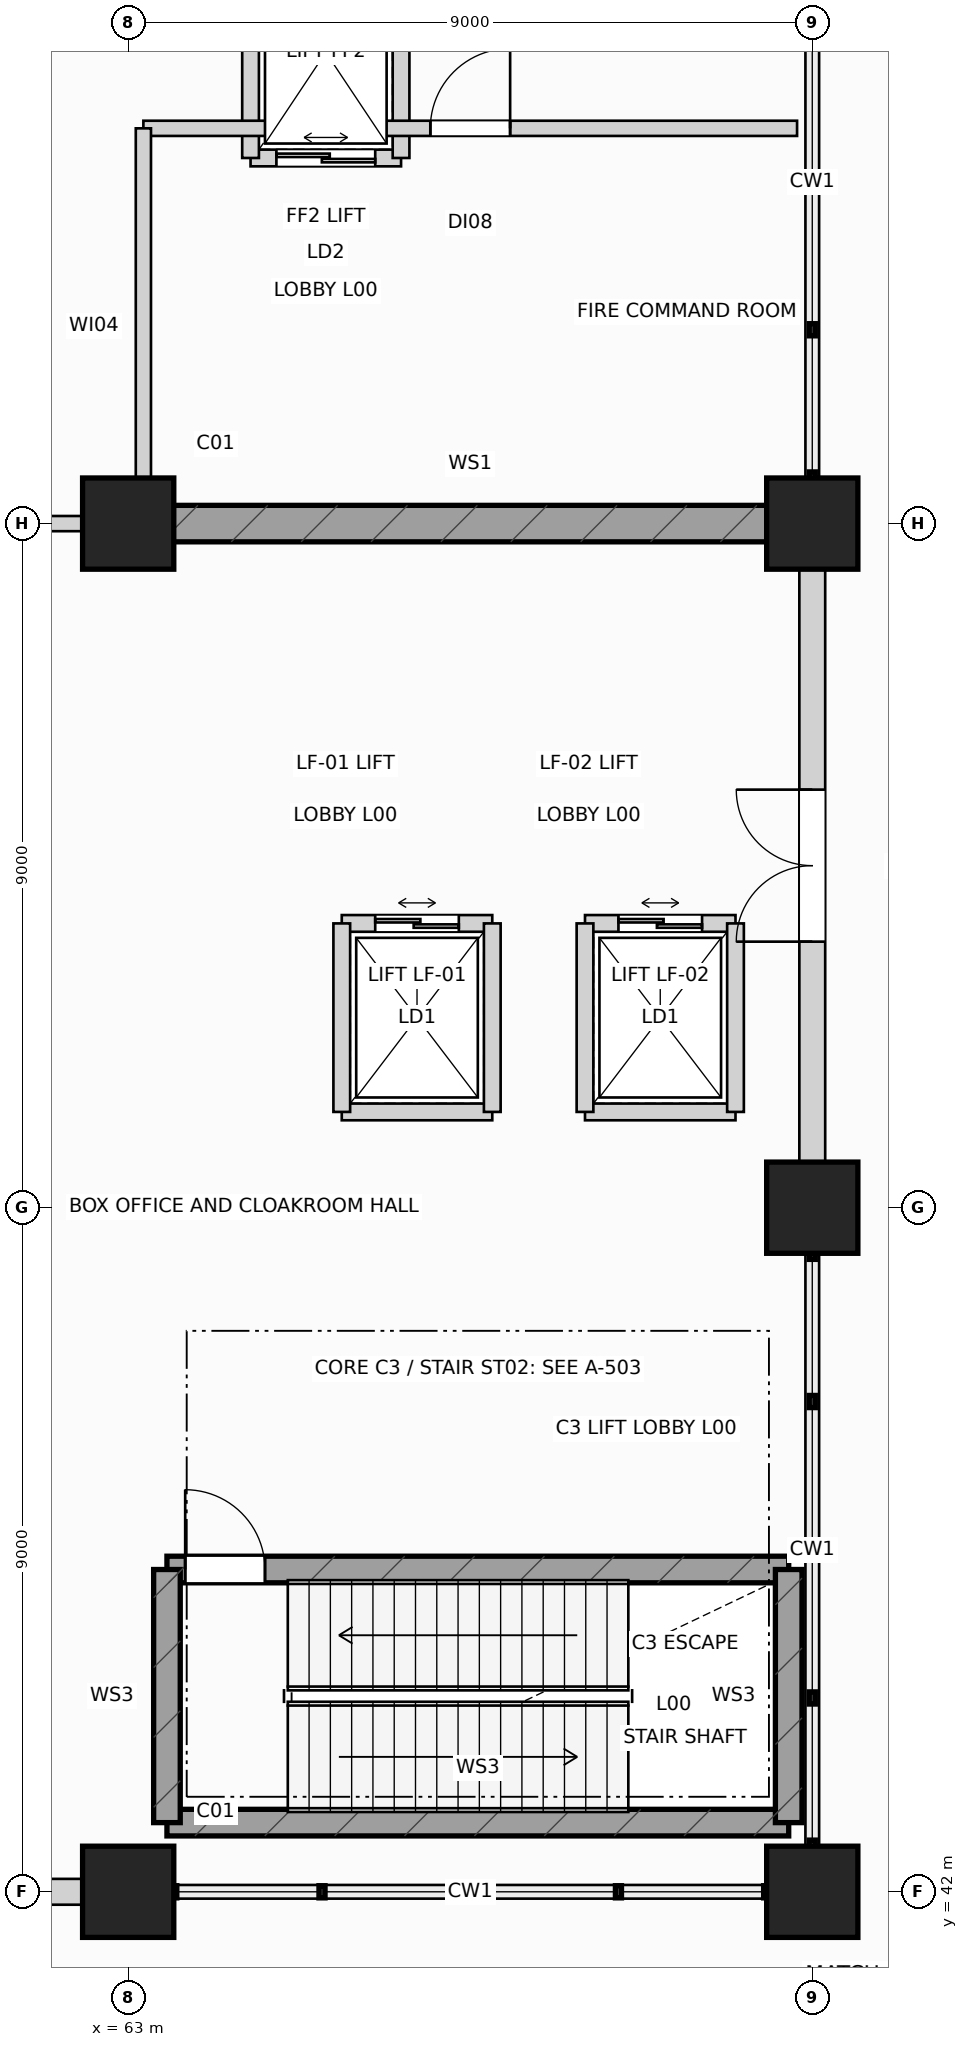
"""IFC4 building model, lengths in metres.
Left out: names, types, materials, properties, quantities, classifications, styles, units other than length and angle.
Written with IfcOpenShell. Run it as: python <this file> out.ifc"""

import sys

from ifc_helpers import new_model, si_unit, direction, frame, frame_2d, origin, origin_2d, place, context, subcontext, project, spatial, rectangle, extrude, element, fill, save


model = new_model("IFC4")
c1 = context("Model", 3, precision=1e-05, world=origin(), true_north=direction((0.0, 1.0)))
c2 = subcontext(c1, "Body", "Model", "MODEL_VIEW")
j1 = project(units=[si_unit("LENGTHUNIT", "METRE"), si_unit("PLANEANGLEUNIT", "RADIAN")], contexts=[c1])
p1 = place(None, origin())
s1 = spatial("IfcSite", under=j1, at=p1, CompositionType="ELEMENT")
p2 = place(p1, origin())
s2 = spatial("IfcBuilding", under=s1, at=p2, CompositionType="ELEMENT")
p3 = place(p2, origin())
s3 = spatial("IfcBuildingStorey", under=s2, at=p3, CompositionType="ELEMENT", Elevation=0.0)
for number, where, z_axis, x_axis in (
    (1, (63.0, 42.0, 0.0), (0.0, 0.0, 1.0), (1.0, 0.0, 0.0)),
    (2, (63.0, 60.0, 0.0), (0.0, 0.0, 1.0), (1.0, 0.0, 0.0)),
    (3, (72.0, 42.0, 0.0), (0.0, 0.0, 1.0), (1.0, 0.0, 0.0)),
    (4, (72.0, 51.0, 0.0), (0.0, 0.0, 1.0), (1.0, 0.0, 0.0)),
    (5, (72.0, 60.0, 0.0), (0.0, 0.0, 1.0), (1.0, 0.0, 0.0)),
):
    element("IfcColumn", number, at=place(p3, frame(where, z_axis=z_axis, x_axis=x_axis)), inside=s3, PredefinedType="COLUMN", context=c2, shape_type="SweptSolid", body=[
        extrude(rectangle(XDim=1.2, YDim=1.2, at=origin_2d()), origin(), (0.0, 0.0, 1.0), 6.0),
    ])
p4 = place(p3, frame((63.0, 60.0, 0.0), z_axis=(0.0, 0.0, 1.0), x_axis=(1.0, 0.0, 0.0)))
e6 = element("IfcWall", 6, at=p4, inside=s3, PredefinedType="SHEAR", context=c2, shape_type="SweptSolid", body=[
    extrude(rectangle(XDim=9.0, YDim=0.48, at=frame_2d((4.5, 0.0))), origin(), (0.0, 0.0, 1.0), 5.7),
])
p5 = place(p3, frame((62.405, 42.0, 0.0), z_axis=(0.0, 0.0, 1.0), x_axis=(-1.0, 0.0, 0.0)))
e7 = element("IfcWall", 7, at=p5, inside=s3, PredefinedType="SOLIDWALL", context=c2, shape_type="SweptSolid", body=[
    extrude(rectangle(XDim=7.81, YDim=0.34, at=frame_2d((3.905, 0.0))), origin(), (0.0, 0.0, 1.0), 5.165),
])
p6 = place(p5, frame((2.905, 0.0, 0.0)))
e8 = element("IfcOpeningElement", 8, at=p6, cuts=e7, PredefinedType="OPENING", context=c2, shape_type="SweptSolid", body=[
    extrude(rectangle(XDim=2.0, YDim=2.4, at=frame_2d((1.0, 1.2))), frame((0.0, 0.18, 0.0), z_axis=(0.0, -1.0, 0.0), x_axis=(1.0, 0.0, 0.0)), (0.0, 0.0, 1.0), 0.36),
])
p7 = place(p3, frame((72.0, 51.595, 0.0), z_axis=(0.0, 0.0, 1.0), x_axis=(0.0, 1.0, 0.0)))
e9 = element("IfcWall", 9, at=p7, inside=s3, PredefinedType="SOLIDWALL", context=c2, shape_type="SweptSolid", body=[
    extrude(rectangle(XDim=7.81, YDim=0.34, at=frame_2d((3.905, 0.0))), origin(), (0.0, 0.0, 1.0), 4.915),
])
p8 = place(p7, frame((2.905, 0.0, 0.0)))
e10 = element("IfcOpeningElement", 10, at=p8, cuts=e9, PredefinedType="OPENING", context=c2, shape_type="SweptSolid", body=[
    extrude(rectangle(XDim=2.0, YDim=2.4, at=frame_2d((1.0, 1.2))), frame((0.0, 0.18, 0.0), z_axis=(0.0, -1.0, 0.0), x_axis=(1.0, 0.0, 0.0)), (0.0, 0.0, 1.0), 0.36),
])
p9 = place(p3, frame((63.51, 42.91, 0.0), z_axis=(0.0, 0.0, 1.0), x_axis=(1.0, 0.0, 0.0)))
e11 = element("IfcWall", 11, at=p9, inside=s3, PredefinedType="SHEAR", context=c2, shape_type="SweptSolid", body=[
    extrude(rectangle(XDim=8.18, YDim=0.35, at=frame_2d((4.09, 0.0))), origin(), (0.0, 0.0, 1.0), 5.7),
])
p10 = place(p3, frame((63.51, 46.24, 0.0), z_axis=(0.0, 0.0, 1.0), x_axis=(1.0, 0.0, 0.0)))
e12 = element("IfcWall", 12, at=p10, inside=s3, PredefinedType="SHEAR", context=c2, shape_type="SweptSolid", body=[
    extrude(rectangle(XDim=8.18, YDim=0.35, at=frame_2d((4.09, 0.0))), origin(), (0.0, 0.0, 1.0), 5.7),
])
p11 = place(p10, frame((0.24, 0.0, 0.0)))
e13 = element("IfcOpeningElement", 13, at=p11, cuts=e12, PredefinedType="OPENING", context=c2, shape_type="SweptSolid", body=[
    extrude(rectangle(XDim=1.05, YDim=2.18, at=frame_2d((0.525, 1.09))), frame((0.0, 0.185, 0.0), z_axis=(0.0, -1.0, 0.0), x_axis=(1.0, 0.0, 0.0)), (0.0, 0.0, 1.0), 0.37),
])
for number, where, z_axis, x_axis in (
    (14, (63.51, 42.91, 0.0), (0.0, 0.0, 1.0), (0.0, 1.0, 0.0)),
    (15, (71.69, 42.91, 0.0), (0.0, 0.0, 1.0), (0.0, 1.0, 0.0)),
):
    element("IfcWall", number, at=place(p3, frame(where, z_axis=z_axis, x_axis=x_axis)), inside=s3, PredefinedType="SHEAR", context=c2, shape_type="SweptSolid", body=[
        extrude(rectangle(XDim=3.33, YDim=0.35, at=frame_2d((1.665, 0.0))), origin(), (0.0, 0.0, 1.0), 5.7),
    ])
p12 = place(p3, frame((65.81, 52.26, 0.0), z_axis=(0.0, 0.0, 1.0), x_axis=(1.0, 0.0, 0.0)))
e16 = element("IfcWall", 16, at=p12, inside=s3, PredefinedType="PARTITIONING", context=c2, shape_type="SweptSolid", body=[
    extrude(rectangle(XDim=1.98, YDim=0.22, at=frame_2d((0.99, 0.0))), origin(), (0.0, 0.0, 1.0), 5.665),
])
p13 = place(p3, frame((65.81, 54.74, 0.0), z_axis=(0.0, 0.0, 1.0), x_axis=(1.0, 0.0, 0.0)))
e17 = element("IfcWall", 17, at=p13, inside=s3, PredefinedType="PARTITIONING", context=c2, shape_type="SweptSolid", body=[
    extrude(rectangle(XDim=1.98, YDim=0.22, at=frame_2d((0.99, 0.0))), origin(), (0.0, 0.0, 1.0), 5.665),
])
p14 = place(p13, frame((0.44, 0.0, 0.0)))
e18 = element("IfcOpeningElement", 18, at=p14, cuts=e17, PredefinedType="OPENING", context=c2, shape_type="SweptSolid", body=[
    extrude(rectangle(XDim=1.1, YDim=2.18, at=frame_2d((0.55, 1.09))), frame((0.0, 0.12, 0.0), z_axis=(0.0, -1.0, 0.0), x_axis=(1.0, 0.0, 0.0)), (0.0, 0.0, 1.0), 0.24),
])
for number, where, z_axis, x_axis in (
    (19, (65.81, 52.26, 0.0), (0.0, 0.0, 1.0), (0.0, 1.0, 0.0)),
    (20, (67.79, 52.26, 0.0), (0.0, 0.0, 1.0), (0.0, 1.0, 0.0)),
):
    element("IfcWall", number, at=place(p3, frame(where, z_axis=z_axis, x_axis=x_axis)), inside=s3, PredefinedType="PARTITIONING", context=c2, shape_type="SweptSolid", body=[
        extrude(rectangle(XDim=2.48, YDim=0.22, at=frame_2d((1.24, 0.0))), origin(), (0.0, 0.0, 1.0), 5.665),
    ])
p15 = place(p3, frame((69.01, 52.26, 0.0), z_axis=(0.0, 0.0, 1.0), x_axis=(1.0, 0.0, 0.0)))
e21 = element("IfcWall", 21, at=p15, inside=s3, PredefinedType="PARTITIONING", context=c2, shape_type="SweptSolid", body=[
    extrude(rectangle(XDim=1.98, YDim=0.22, at=frame_2d((0.99, 0.0))), origin(), (0.0, 0.0, 1.0), 5.665),
])
p16 = place(p3, frame((69.01, 54.74, 0.0), z_axis=(0.0, 0.0, 1.0), x_axis=(1.0, 0.0, 0.0)))
e22 = element("IfcWall", 22, at=p16, inside=s3, PredefinedType="PARTITIONING", context=c2, shape_type="SweptSolid", body=[
    extrude(rectangle(XDim=1.98, YDim=0.22, at=frame_2d((0.99, 0.0))), origin(), (0.0, 0.0, 1.0), 5.665),
])
p17 = place(p16, frame((0.44, 0.0, 0.0)))
e23 = element("IfcOpeningElement", 23, at=p17, cuts=e22, PredefinedType="OPENING", context=c2, shape_type="SweptSolid", body=[
    extrude(rectangle(XDim=1.1, YDim=2.18, at=frame_2d((0.55, 1.09))), frame((0.0, 0.12, 0.0), z_axis=(0.0, -1.0, 0.0), x_axis=(1.0, 0.0, 0.0)), (0.0, 0.0, 1.0), 0.24),
])
for number, where, z_axis, x_axis in (
    (24, (69.01, 52.26, 0.0), (0.0, 0.0, 1.0), (0.0, 1.0, 0.0)),
    (25, (70.99, 52.26, 0.0), (0.0, 0.0, 1.0), (0.0, 1.0, 0.0)),
):
    element("IfcWall", number, at=place(p3, frame(where, z_axis=z_axis, x_axis=x_axis)), inside=s3, PredefinedType="PARTITIONING", context=c2, shape_type="SweptSolid", body=[
        extrude(rectangle(XDim=2.48, YDim=0.22, at=frame_2d((1.24, 0.0))), origin(), (0.0, 0.0, 1.0), 5.665),
    ])
p18 = place(p3, frame((64.61, 64.81, 0.0), z_axis=(0.0, 0.0, 1.0), x_axis=(1.0, 0.0, 0.0)))
e26 = element("IfcWall", 26, at=p18, inside=s3, PredefinedType="PARTITIONING", context=c2, shape_type="SweptSolid", body=[
    extrude(rectangle(XDim=1.98, YDim=0.22, at=frame_2d((0.99, 0.0))), origin(), (0.0, 0.0, 1.0), 5.665),
])
p19 = place(p18, frame((0.34, 0.0, 0.0)))
e27 = element("IfcOpeningElement", 27, at=p19, cuts=e26, PredefinedType="OPENING", context=c2, shape_type="SweptSolid", body=[
    extrude(rectangle(XDim=1.3, YDim=2.2, at=frame_2d((0.65, 1.1))), frame((0.0, 0.12, 0.0), z_axis=(0.0, -1.0, 0.0), x_axis=(1.0, 0.0, 0.0)), (0.0, 0.0, 1.0), 0.24),
])
for number, where, z_axis, x_axis in (
    (28, (64.61, 64.81, 0.0), (0.0, 0.0, 1.0), (0.0, 1.0, 0.0)),
    (29, (66.59, 64.81, 0.0), (0.0, 0.0, 1.0), (0.0, 1.0, 0.0)),
):
    element("IfcWall", number, at=place(p3, frame(where, z_axis=z_axis, x_axis=x_axis)), inside=s3, PredefinedType="PARTITIONING", context=c2, shape_type="SweptSolid", body=[
        extrude(rectangle(XDim=2.78, YDim=0.22, at=frame_2d((1.39, 0.0))), origin(), (0.0, 0.0, 1.0), 5.365),
    ])
p20 = place(p3, frame((56.6, 60.0, 0.0), z_axis=(0.0, 0.0, 1.0), x_axis=(1.0, 0.0, 0.0)))
e30 = element("IfcWall", 30, at=p20, inside=s3, PredefinedType="PARTITIONING", context=c2, shape_type="SweptSolid", body=[
    extrude(rectangle(XDim=6.4, YDim=0.2, at=frame_2d((3.2, 0.0))), origin(), (0.0, 0.0, 1.0), 5.225),
])
p21 = place(p3, frame((63.2, 65.2, 0.0), z_axis=(0.0, 0.0, 1.0), x_axis=(1.0, 0.0, 0.0)))
e31 = element("IfcWall", 31, at=p21, inside=s3, PredefinedType="PARTITIONING", context=c2, shape_type="SweptSolid", body=[
    extrude(rectangle(XDim=8.6, YDim=0.2, at=frame_2d((4.3, 0.0))), origin(), (0.0, 0.0, 1.0), 5.015),
])
p22 = place(p21, frame((3.775, 0.0, 0.0)))
e32 = element("IfcOpeningElement", 32, at=p22, cuts=e31, PredefinedType="OPENING", context=c2, shape_type="SweptSolid", body=[
    extrude(rectangle(XDim=1.05, YDim=2.12, at=frame_2d((0.525, 1.06))), frame((0.0, 0.11, 0.0), z_axis=(0.0, -1.0, 0.0), x_axis=(1.0, 0.0, 0.0)), (0.0, 0.0, 1.0), 0.22),
])
p23 = place(p3, frame((63.2, 60.0, 0.0), z_axis=(0.0, 0.0, 1.0), x_axis=(0.0, 1.0, 0.0)))
e33 = element("IfcWall", 33, at=p23, inside=s3, PredefinedType="PARTITIONING", context=c2, shape_type="SweptSolid", body=[
    extrude(rectangle(XDim=5.2, YDim=0.2, at=frame_2d((2.6, 0.0))), origin(), (0.0, 0.0, 1.0), 5.225),
])
p24 = place(p8, origin())
e34 = element("IfcDoor", 34, at=p24, inside=s3, OperationType="DOUBLE_DOOR_SINGLE_SWING", PredefinedType="DOOR", context=c2, shape_type="SweptSolid", body=[
    extrude(rectangle(XDim=2.0, YDim=2.4, at=frame_2d((1.0, 1.2))), frame((0.0, 0.025, 0.0), z_axis=(0.0, -1.0, 0.0), x_axis=(1.0, 0.0, 0.0)), (0.0, 0.0, 1.0), 0.05),
])
fill(e10, e34)
p25 = place(p11, origin())
e35 = element("IfcDoor", 35, at=p25, inside=s3, OperationType="SINGLE_SWING_LEFT", PredefinedType="DOOR", context=c2, shape_type="SweptSolid", body=[
    extrude(rectangle(XDim=1.05, YDim=2.18, at=frame_2d((0.525, 1.09))), frame((0.0, 0.025, 0.0), z_axis=(0.0, -1.0, 0.0), x_axis=(1.0, 0.0, 0.0)), (0.0, 0.0, 1.0), 0.05),
])
fill(e13, e35)
p26 = place(p14, origin())
e36 = element("IfcDoor", 36, at=p26, inside=s3, OperationType="DOUBLE_DOOR_SLIDING", PredefinedType="DOOR", context=c2, shape_type="SweptSolid", body=[
    extrude(rectangle(XDim=1.1, YDim=2.18, at=frame_2d((0.55, 1.09))), frame((0.0, 0.025, 0.0), z_axis=(0.0, -1.0, 0.0), x_axis=(1.0, 0.0, 0.0)), (0.0, 0.0, 1.0), 0.05),
])
fill(e18, e36)
p27 = place(p17, origin())
e37 = element("IfcDoor", 37, at=p27, inside=s3, OperationType="DOUBLE_DOOR_SLIDING", PredefinedType="DOOR", context=c2, shape_type="SweptSolid", body=[
    extrude(rectangle(XDim=1.1, YDim=2.18, at=frame_2d((0.55, 1.09))), frame((0.0, 0.025, 0.0), z_axis=(0.0, -1.0, 0.0), x_axis=(1.0, 0.0, 0.0)), (0.0, 0.0, 1.0), 0.05),
])
fill(e23, e37)
p28 = place(p19, origin())
e38 = element("IfcDoor", 38, at=p28, inside=s3, OperationType="DOUBLE_DOOR_SLIDING", PredefinedType="DOOR", context=c2, shape_type="SweptSolid", body=[
    extrude(rectangle(XDim=1.3, YDim=2.2, at=frame_2d((0.65, 1.1))), frame((0.0, 0.025, 0.0), z_axis=(0.0, -1.0, 0.0), x_axis=(1.0, 0.0, 0.0)), (0.0, 0.0, 1.0), 0.05),
])
fill(e27, e38)
p29 = place(p22, origin())
e39 = element("IfcDoor", 39, at=p29, inside=s3, OperationType="SINGLE_SWING_RIGHT", PredefinedType="DOOR", context=c2, shape_type="SweptSolid", body=[
    extrude(rectangle(XDim=1.05, YDim=2.12, at=frame_2d((0.525, 1.06))), frame((0.0, 0.025, 0.0), z_axis=(0.0, -1.0, 0.0), x_axis=(1.0, 0.0, 0.0)), (0.0, 0.0, 1.0), 0.05),
])
fill(e32, e39)
save(model, sys.argv[1])
